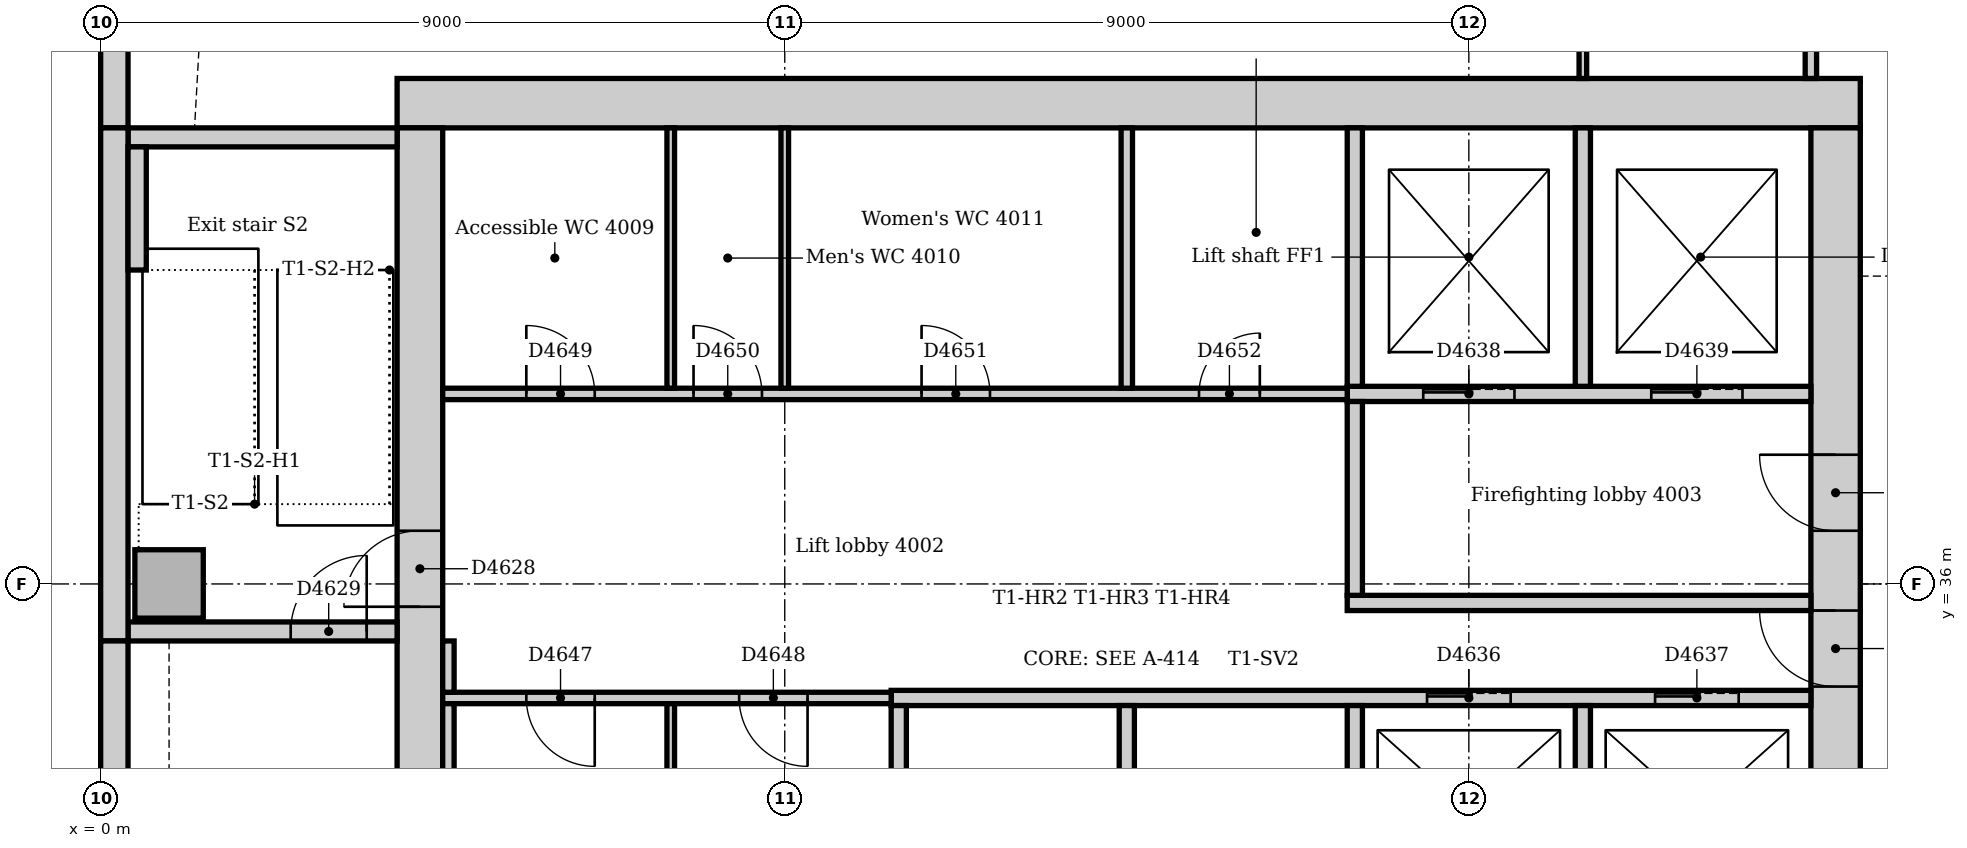
"""IFC4 building model, lengths in metres.
Left out: names, types, materials, properties, quantities, classifications, styles, units other than length and angle.
Written with IfcOpenShell. Run it as: python <this file> out.ifc"""

import sys

from ifc_helpers import new_model, si_unit, direction, frame, frame_2d, origin, origin_2d, place, context, subcontext, project, spatial, rectangle, extrude, element, fill, save


model = new_model("IFC4")
c1 = context("Model", 3, precision=1e-05, world=origin(), true_north=direction((0.0, 1.0)))
c2 = subcontext(c1, "Body", "Model", "MODEL_VIEW")
j1 = project(units=[si_unit("LENGTHUNIT", "METRE"), si_unit("PLANEANGLEUNIT", "RADIAN")], contexts=[c1])
p1 = place(None, origin())
s1 = spatial("IfcSite", under=j1, at=p1, CompositionType="ELEMENT")
p2 = place(p1, origin())
s2 = spatial("IfcBuilding", under=s1, at=p2, CompositionType="ELEMENT")
p3 = place(p2, frame((0.0, 0.0, 169.0)))
s3 = spatial("IfcBuildingStorey", under=s2, at=p3, CompositionType="ELEMENT", Elevation=169.0)
p4 = place(p3, frame((23.15, 42.325, 0.0), z_axis=(0.0, 0.0, 1.0), x_axis=(-1.0, 0.0, 0.0)))
e1 = element("IfcWall", 1, at=p4, inside=s3, PredefinedType="SOLIDWALL", context=c2, shape_type="SweptSolid", body=[
    extrude(rectangle(XDim=19.25, YDim=0.65, at=frame_2d((9.625, 0.0))), origin(), (0.0, 0.0, 1.0), 4.0),
])
p5 = place(p3, frame((22.825, 31.5, 0.0), z_axis=(0.0, 0.0, 1.0), x_axis=(0.0, 1.0, 0.0)))
e2 = element("IfcWall", 2, at=p5, inside=s3, PredefinedType="SOLIDWALL", context=c2, shape_type="SweptSolid", body=[
    extrude(rectangle(XDim=10.5, YDim=0.65, at=frame_2d((5.25, 0.0))), origin(), (0.0, 0.0, 1.0), 4.0),
])
p6 = place(p5, frame((3.15, 0.0, 0.0)))
e3 = element("IfcOpeningElement", 3, at=p6, cuts=e2, PredefinedType="OPENING", context=c2, shape_type="SweptSolid", body=[
    extrude(rectangle(XDim=1.0, YDim=2.1, at=frame_2d((0.5, 1.05))), frame((0.0, 0.335, 0.0), z_axis=(0.0, -1.0, 0.0), x_axis=(1.0, 0.0, 0.0)), (0.0, 0.0, 1.0), 0.67),
])
p7 = place(p5, frame((5.2, 0.0, 0.0)))
e4 = element("IfcOpeningElement", 4, at=p7, cuts=e2, PredefinedType="OPENING", context=c2, shape_type="SweptSolid", body=[
    extrude(rectangle(XDim=1.0, YDim=2.1, at=frame_2d((0.5, 1.05))), frame((0.0, 0.335, 0.0), z_axis=(0.0, -1.0, 0.0), x_axis=(1.0, 0.0, 0.0)), (0.0, 0.0, 1.0), 0.67),
])
p8 = place(p3, frame((4.2, 42.0, 0.0), z_axis=(0.0, 0.0, 1.0), x_axis=(0.0, -1.0, 0.0)))
e5 = element("IfcWall", 5, at=p8, inside=s3, PredefinedType="SOLIDWALL", context=c2, shape_type="SweptSolid", body=[
    extrude(rectangle(XDim=10.5, YDim=0.6, at=frame_2d((5.25, 0.0))), origin(), (0.0, 0.0, 1.0), 4.0),
])
p9 = place(p8, frame((5.3, 0.0, 0.0)))
e6 = element("IfcOpeningElement", 6, at=p9, cuts=e5, PredefinedType="OPENING", context=c2, shape_type="SweptSolid", body=[
    extrude(rectangle(XDim=1.0, YDim=2.1, at=frame_2d((0.5, 1.05))), frame((0.0, 0.31, 0.0), z_axis=(0.0, -1.0, 0.0), x_axis=(1.0, 0.0, 0.0)), (0.0, 0.0, 1.0), 0.62),
])
p10 = place(p3, frame((0.36, 35.375, 0.0), z_axis=(0.0, 0.0, 1.0), x_axis=(1.0, 0.0, 0.0)))
e7 = element("IfcWall", 7, at=p10, inside=s3, PredefinedType="SOLIDWALL", context=c2, shape_type="SweptSolid", body=[
    extrude(rectangle(XDim=3.54, YDim=0.25, at=frame_2d((1.77, 0.0))), origin(), (0.0, 0.0, 1.0), 4.0),
])
p11 = place(p10, frame((2.14, 0.0, 0.0)))
e8 = element("IfcOpeningElement", 8, at=p11, cuts=e7, PredefinedType="OPENING", context=c2, shape_type="SweptSolid", body=[
    extrude(rectangle(XDim=1.0, YDim=2.1, at=frame_2d((0.5, 1.05))), frame((0.0, 0.135, 0.0), z_axis=(0.0, -1.0, 0.0), x_axis=(1.0, 0.0, 0.0)), (0.0, 0.0, 1.0), 0.27),
])
p12 = place(p3, frame((3.9, 41.875, 0.0), z_axis=(0.0, 0.0, 1.0), x_axis=(-1.0, 0.0, 0.0)))
e9 = element("IfcWall", 9, at=p12, inside=s3, PredefinedType="SOLIDWALL", context=c2, shape_type="SweptSolid", body=[
    extrude(rectangle(XDim=3.54, YDim=0.25, at=frame_2d((1.77, 0.0))), origin(), (0.0, 0.0, 1.0), 4.0),
])
p13 = place(p3, frame((0.9, 36.0, 0.0), z_axis=(0.0, 0.0, 1.0), x_axis=(1.0, 0.0, 0.0)))
e10 = element("IfcColumn", 10, at=p13, inside=s3, PredefinedType="COLUMN", context=c2, shape_type="SweptSolid", body=[
    extrude(rectangle(XDim=0.9, YDim=0.9, at=origin_2d()), origin(), (0.0, 0.0, 1.0), 4.0),
])
p14 = place(p3, frame((0.18, 49.757, 0.0), z_axis=(0.0, 0.0, 1.0), x_axis=(0.0, -1.0, 0.0)))
e11 = element("IfcWall", 11, at=p14, inside=s3, PredefinedType="STANDARD", context=c2, shape_type="SweptSolid", body=[
    extrude(rectangle(XDim=7.757, YDim=0.36, at=frame_2d((3.879, 0.0))), origin(), (0.0, 0.0, 1.0), 3.85),
])
p15 = place(p14, frame((3.107, 0.0, 0.9)))
e12 = element("IfcOpeningElement", 12, at=p15, cuts=e11, PredefinedType="OPENING", context=c2, shape_type="SweptSolid", body=[
    extrude(rectangle(XDim=3.3, YDim=1.6, at=frame_2d((1.65, 0.8))), frame((0.0, 0.19, 0.0), z_axis=(0.0, -1.0, 0.0), x_axis=(1.0, 0.0, 0.0)), (0.0, 0.0, 1.0), 0.38),
])
p16 = place(p3, frame((0.18, 42.0, 0.0), z_axis=(0.0, 0.0, 1.0), x_axis=(0.0, -1.0, 0.0)))
e13 = element("IfcWall", 13, at=p16, inside=s3, PredefinedType="STANDARD", context=c2, shape_type="SweptSolid", body=[
    extrude(rectangle(XDim=6.75, YDim=0.36, at=frame_2d((3.375, 0.0))), origin(), (0.0, 0.0, 1.0), 3.85),
])
p17 = place(p3, frame((0.18, 35.25, 0.0), z_axis=(0.0, 0.0, 1.0), x_axis=(0.0, -1.0, 0.0)))
e14 = element("IfcWall", 14, at=p17, inside=s3, PredefinedType="STANDARD", context=c2, shape_type="SweptSolid", body=[
    extrude(rectangle(XDim=7.5, YDim=0.36, at=frame_2d((3.75, 0.0))), origin(), (0.0, 0.0, 1.0), 3.85),
])
p18 = place(p3, frame((0.48, 40.13, 0.0), z_axis=(0.0, 0.0, 1.0), x_axis=(0.0, 1.0, 0.0)))
e15 = element("IfcWall", 15, at=p18, inside=s3, PredefinedType="STANDARD", context=c2, shape_type="SweptSolid", body=[
    extrude(rectangle(XDim=1.62, YDim=0.24, at=frame_2d((0.81, 0.0))), origin(), (0.0, 0.0, 1.0), 4.0),
])
p19 = place(p3, frame((16.4, 35.75, 0.0), z_axis=(0.0, 0.0, 1.0), x_axis=(1.0, 0.0, 0.0)))
e16 = element("IfcWall", 16, at=p19, inside=s3, PredefinedType="PARTITIONING", context=c2, shape_type="SweptSolid", body=[
    extrude(rectangle(XDim=6.1, YDim=0.2, at=frame_2d((3.05, 0.0))), origin(), (0.0, 0.0, 1.0), 3.85),
])
p20 = place(p3, frame((16.4, 38.5, 0.0), z_axis=(0.0, 0.0, 1.0), x_axis=(1.0, 0.0, 0.0)))
e17 = element("IfcWall", 17, at=p20, inside=s3, PredefinedType="PARTITIONING", context=c2, shape_type="SweptSolid", body=[
    extrude(rectangle(XDim=6.1, YDim=0.2, at=frame_2d((3.05, 0.0))), origin(), (0.0, 0.0, 1.0), 3.85),
])
p21 = place(p20, frame((1.0, 0.0, 0.0)))
e18 = element("IfcOpeningElement", 18, at=p21, cuts=e17, PredefinedType="OPENING", context=c2, shape_type="SweptSolid", body=[
    extrude(rectangle(XDim=1.2, YDim=2.1, at=frame_2d((0.6, 1.05))), frame((0.0, 0.11, 0.0), z_axis=(0.0, -1.0, 0.0), x_axis=(1.0, 0.0, 0.0)), (0.0, 0.0, 1.0), 0.22),
])
p22 = place(p20, frame((4.0, 0.0, 0.0)))
e19 = element("IfcOpeningElement", 19, at=p22, cuts=e17, PredefinedType="OPENING", context=c2, shape_type="SweptSolid", body=[
    extrude(rectangle(XDim=1.2, YDim=2.1, at=frame_2d((0.6, 1.05))), frame((0.0, 0.11, 0.0), z_axis=(0.0, -1.0, 0.0), x_axis=(1.0, 0.0, 0.0)), (0.0, 0.0, 1.0), 0.22),
])
p23 = place(p3, frame((16.5, 35.85, 0.0), z_axis=(0.0, 0.0, 1.0), x_axis=(0.0, 1.0, 0.0)))
e20 = element("IfcWall", 20, at=p23, inside=s3, PredefinedType="PARTITIONING", context=c2, shape_type="SweptSolid", body=[
    extrude(rectangle(XDim=2.55, YDim=0.2, at=frame_2d((1.275, 0.0))), origin(), (0.0, 0.0, 1.0), 3.85),
])
p24 = place(p3, frame((10.4, 34.5, 0.0), z_axis=(0.0, 0.0, 1.0), x_axis=(1.0, 0.0, 0.0)))
e21 = element("IfcWall", 21, at=p24, inside=s3, PredefinedType="PARTITIONING", context=c2, shape_type="SweptSolid", body=[
    extrude(rectangle(XDim=12.1, YDim=0.2, at=frame_2d((6.05, 0.0))), origin(), (0.0, 0.0, 1.0), 3.85),
])
p25 = place(p24, frame((7.05, 0.0, 0.0)))
e22 = element("IfcOpeningElement", 22, at=p25, cuts=e21, PredefinedType="OPENING", context=c2, shape_type="SweptSolid", body=[
    extrude(rectangle(XDim=1.1, YDim=2.1, at=frame_2d((0.55, 1.05))), frame((0.0, 0.11, 0.0), z_axis=(0.0, -1.0, 0.0), x_axis=(1.0, 0.0, 0.0)), (0.0, 0.0, 1.0), 0.22),
])
p26 = place(p24, frame((10.05, 0.0, 0.0)))
e23 = element("IfcOpeningElement", 23, at=p26, cuts=e21, PredefinedType="OPENING", context=c2, shape_type="SweptSolid", body=[
    extrude(rectangle(XDim=1.1, YDim=2.1, at=frame_2d((0.55, 1.05))), frame((0.0, 0.11, 0.0), z_axis=(0.0, -1.0, 0.0), x_axis=(1.0, 0.0, 0.0)), (0.0, 0.0, 1.0), 0.22),
])
for number, where, z_axis, x_axis in (
    (24, (10.5, 31.75, 0.0), (0.0, 0.0, 1.0), (0.0, 1.0, 0.0)),
    (25, (13.5, 31.75, 0.0), (0.0, 0.0, 1.0), (0.0, 1.0, 0.0)),
    (26, (16.5, 31.75, 0.0), (0.0, 0.0, 1.0), (0.0, 1.0, 0.0)),
    (27, (19.5, 31.75, 0.0), (0.0, 0.0, 1.0), (0.0, 1.0, 0.0)),
):
    element("IfcWall", number, at=place(p3, frame(where, z_axis=z_axis, x_axis=x_axis)), inside=s3, PredefinedType="PARTITIONING", context=c2, shape_type="SweptSolid", body=[
        extrude(rectangle(XDim=2.65, YDim=0.2, at=frame_2d((1.325, 0.0))), origin(), (0.0, 0.0, 1.0), 3.85),
    ])
for number, where, z_axis, x_axis in (
    (28, (16.5, 38.6, 0.0), (0.0, 0.0, 1.0), (0.0, 1.0, 0.0)),
    (29, (19.5, 38.6, 0.0), (0.0, 0.0, 1.0), (0.0, 1.0, 0.0)),
):
    element("IfcWall", number, at=place(p3, frame(where, z_axis=z_axis, x_axis=x_axis)), inside=s3, PredefinedType="PARTITIONING", context=c2, shape_type="SweptSolid", body=[
        extrude(rectangle(XDim=3.4, YDim=0.2, at=frame_2d((1.7, 0.0))), origin(), (0.0, 0.0, 1.0), 3.85),
    ])
p27 = place(p3, frame((4.5, 38.5, 0.0), z_axis=(0.0, 0.0, 1.0), x_axis=(1.0, 0.0, 0.0)))
e30 = element("IfcWall", 30, at=p27, inside=s3, PredefinedType="PARTITIONING", context=c2, shape_type="SweptSolid", body=[
    extrude(rectangle(XDim=11.9, YDim=0.15, at=frame_2d((5.95, 0.0))), origin(), (0.0, 0.0, 1.0), 3.85),
])
p28 = place(p27, frame((1.1, 0.0, 0.0)))
e31 = element("IfcOpeningElement", 31, at=p28, cuts=e30, PredefinedType="OPENING", context=c2, shape_type="SweptSolid", body=[
    extrude(rectangle(XDim=0.9, YDim=2.1, at=frame_2d((0.45, 1.05))), frame((0.0, 0.085, 0.0), z_axis=(0.0, -1.0, 0.0), x_axis=(1.0, 0.0, 0.0)), (0.0, 0.0, 1.0), 0.17),
])
p29 = place(p27, frame((3.3, 0.0, 0.0)))
e32 = element("IfcOpeningElement", 32, at=p29, cuts=e30, PredefinedType="OPENING", context=c2, shape_type="SweptSolid", body=[
    extrude(rectangle(XDim=0.9, YDim=2.1, at=frame_2d((0.45, 1.05))), frame((0.0, 0.085, 0.0), z_axis=(0.0, -1.0, 0.0), x_axis=(1.0, 0.0, 0.0)), (0.0, 0.0, 1.0), 0.17),
])
p30 = place(p27, frame((6.3, 0.0, 0.0)))
e33 = element("IfcOpeningElement", 33, at=p30, cuts=e30, PredefinedType="OPENING", context=c2, shape_type="SweptSolid", body=[
    extrude(rectangle(XDim=0.9, YDim=2.1, at=frame_2d((0.45, 1.05))), frame((0.0, 0.085, 0.0), z_axis=(0.0, -1.0, 0.0), x_axis=(1.0, 0.0, 0.0)), (0.0, 0.0, 1.0), 0.17),
])
p31 = place(p27, frame((9.95, 0.0, 0.0)))
e34 = element("IfcOpeningElement", 34, at=p31, cuts=e30, PredefinedType="OPENING", context=c2, shape_type="SweptSolid", body=[
    extrude(rectangle(XDim=0.8, YDim=2.1, at=frame_2d((0.4, 1.05))), frame((0.0, 0.085, 0.0), z_axis=(0.0, -1.0, 0.0), x_axis=(1.0, 0.0, 0.0)), (0.0, 0.0, 1.0), 0.17),
])
p32 = place(p3, frame((4.5, 34.5, 0.0), z_axis=(0.0, 0.0, 1.0), x_axis=(1.0, 0.0, 0.0)))
e35 = element("IfcWall", 35, at=p32, inside=s3, PredefinedType="PARTITIONING", context=c2, shape_type="SweptSolid", body=[
    extrude(rectangle(XDim=5.9, YDim=0.15, at=frame_2d((2.95, 0.0))), origin(), (0.0, 0.0, 1.0), 3.85),
])
p33 = place(p32, frame((1.1, 0.0, 0.0)))
e36 = element("IfcOpeningElement", 36, at=p33, cuts=e35, PredefinedType="OPENING", context=c2, shape_type="SweptSolid", body=[
    extrude(rectangle(XDim=0.9, YDim=2.1, at=frame_2d((0.45, 1.05))), frame((0.0, 0.085, 0.0), z_axis=(0.0, -1.0, 0.0), x_axis=(1.0, 0.0, 0.0)), (0.0, 0.0, 1.0), 0.17),
])
p34 = place(p32, frame((3.9, 0.0, 0.0)))
e37 = element("IfcOpeningElement", 37, at=p34, cuts=e35, PredefinedType="OPENING", context=c2, shape_type="SweptSolid", body=[
    extrude(rectangle(XDim=0.9, YDim=2.1, at=frame_2d((0.45, 1.05))), frame((0.0, 0.085, 0.0), z_axis=(0.0, -1.0, 0.0), x_axis=(1.0, 0.0, 0.0)), (0.0, 0.0, 1.0), 0.17),
])
p35 = place(p3, frame((4.575, 34.575, 0.0), z_axis=(0.0, 0.0, 1.0), x_axis=(0.0, 1.0, 0.0)))
e38 = element("IfcWall", 38, at=p35, inside=s3, PredefinedType="PARTITIONING", context=c2, shape_type="SweptSolid", body=[
    extrude(rectangle(XDim=0.675, YDim=0.15, at=frame_2d((0.338, 0.0))), origin(), (0.0, 0.0, 1.0), 3.85),
])
p36 = place(p3, frame((4.575, 31.75, 0.0), z_axis=(0.0, 0.0, 1.0), x_axis=(0.0, 1.0, 0.0)))
e39 = element("IfcWall", 39, at=p36, inside=s3, PredefinedType="PARTITIONING", context=c2, shape_type="SweptSolid", body=[
    extrude(rectangle(XDim=2.675, YDim=0.15, at=frame_2d((1.337, 0.0))), origin(), (0.0, 0.0, 1.0), 3.85),
])
p37 = place(p3, frame((22.5, 42.65, 0.0), z_axis=(0.0, 0.0, 1.0), x_axis=(0.0, 1.0, 0.0)))
e40 = element("IfcWall", 40, at=p37, inside=s3, PredefinedType="PARTITIONING", context=c2, shape_type="SweptSolid", body=[
    extrude(rectangle(XDim=2.275, YDim=0.15, at=frame_2d((1.137, 0.0))), origin(), (0.0, 0.0, 1.0), 3.85),
])
p38 = place(p3, frame((13.5, 38.575, 0.0), z_axis=(0.0, 0.0, 1.0), x_axis=(0.0, 1.0, 0.0)))
e41 = element("IfcWall", 41, at=p38, inside=s3, PredefinedType="PARTITIONING", context=c2, shape_type="SweptSolid", body=[
    extrude(rectangle(XDim=3.425, YDim=0.15, at=frame_2d((1.712, 0.0))), origin(), (0.0, 0.0, 1.0), 3.85),
])
p39 = place(p3, frame((19.5, 42.65, 0.0), z_axis=(0.0, 0.0, 1.0), x_axis=(0.0, 1.0, 0.0)))
e42 = element("IfcWall", 42, at=p39, inside=s3, PredefinedType="PARTITIONING", context=c2, shape_type="SweptSolid", body=[
    extrude(rectangle(XDim=10.99, YDim=0.1, at=frame_2d((5.495, 0.0))), origin(), (0.0, 0.0, 1.0), 3.85),
])
p40 = place(p39, frame((5.05, 0.0, 0.0)))
e43 = element("IfcOpeningElement", 43, at=p40, cuts=e42, PredefinedType="OPENING", context=c2, shape_type="SweptSolid", body=[
    extrude(rectangle(XDim=0.9, YDim=2.1, at=frame_2d((0.45, 1.05))), frame((0.0, 0.06, 0.0), z_axis=(0.0, -1.0, 0.0), x_axis=(1.0, 0.0, 0.0)), (0.0, 0.0, 1.0), 0.12),
])
for number, where, z_axis, x_axis in (
    (44, (7.5, 38.575, 0.0), (0.0, 0.0, 1.0), (0.0, 1.0, 0.0)),
    (45, (9.0, 38.575, 0.0), (0.0, 0.0, 1.0), (0.0, 1.0, 0.0)),
):
    element("IfcWall", number, at=place(p3, frame(where, z_axis=z_axis, x_axis=x_axis)), inside=s3, PredefinedType="PARTITIONING", context=c2, shape_type="SweptSolid", body=[
        extrude(rectangle(XDim=3.425, YDim=0.1, at=frame_2d((1.712, 0.0))), origin(), (0.0, 0.0, 1.0), 3.85),
    ])
p41 = place(p3, frame((7.5, 31.75, 0.0), z_axis=(0.0, 0.0, 1.0), x_axis=(0.0, 1.0, 0.0)))
e46 = element("IfcWall", 46, at=p41, inside=s3, PredefinedType="PARTITIONING", context=c2, shape_type="SweptSolid", body=[
    extrude(rectangle(XDim=2.675, YDim=0.1, at=frame_2d((1.337, 0.0))), origin(), (0.0, 0.0, 1.0), 3.85),
])
p42 = place(p9, frame((1.0, 0.0, 0.0), z_axis=(0.0, 0.0, 1.0), x_axis=(-1.0, 0.0, 0.0)))
e47 = element("IfcDoor", 47, at=p42, inside=s3, OperationType="SINGLE_SWING_LEFT", PredefinedType="DOOR", context=c2, shape_type="SweptSolid", body=[
    extrude(rectangle(XDim=1.0, YDim=2.1, at=frame_2d((0.5, 1.05))), frame((0.0, 0.025, 0.0), z_axis=(0.0, -1.0, 0.0), x_axis=(1.0, 0.0, 0.0)), (0.0, 0.0, 1.0), 0.05),
])
fill(e6, e47)
p43 = place(p11, origin())
e48 = element("IfcDoor", 48, at=p43, inside=s3, OperationType="SINGLE_SWING_RIGHT", PredefinedType="DOOR", context=c2, shape_type="SweptSolid", body=[
    extrude(rectangle(XDim=1.0, YDim=2.1, at=frame_2d((0.5, 1.05))), frame((0.0, 0.025, 0.0), z_axis=(0.0, -1.0, 0.0), x_axis=(1.0, 0.0, 0.0)), (0.0, 0.0, 1.0), 0.05),
])
fill(e8, e48)
p44 = place(p25, origin())
e49 = element("IfcDoor", 49, at=p44, inside=s3, OperationType="SLIDING_TO_LEFT", PredefinedType="DOOR", context=c2, shape_type="SweptSolid", body=[
    extrude(rectangle(XDim=1.1, YDim=2.1, at=frame_2d((0.55, 1.05))), frame((0.0, 0.025, 0.0), z_axis=(0.0, -1.0, 0.0), x_axis=(1.0, 0.0, 0.0)), (0.0, 0.0, 1.0), 0.05),
])
fill(e22, e49)
p45 = place(p26, origin())
e50 = element("IfcDoor", 50, at=p45, inside=s3, OperationType="SLIDING_TO_LEFT", PredefinedType="DOOR", context=c2, shape_type="SweptSolid", body=[
    extrude(rectangle(XDim=1.1, YDim=2.1, at=frame_2d((0.55, 1.05))), frame((0.0, 0.025, 0.0), z_axis=(0.0, -1.0, 0.0), x_axis=(1.0, 0.0, 0.0)), (0.0, 0.0, 1.0), 0.05),
])
fill(e23, e50)
p46 = place(p21, origin())
e51 = element("IfcDoor", 51, at=p46, inside=s3, OperationType="SLIDING_TO_LEFT", PredefinedType="DOOR", context=c2, shape_type="SweptSolid", body=[
    extrude(rectangle(XDim=1.2, YDim=2.1, at=frame_2d((0.6, 1.05))), frame((0.0, 0.025, 0.0), z_axis=(0.0, -1.0, 0.0), x_axis=(1.0, 0.0, 0.0)), (0.0, 0.0, 1.0), 0.05),
])
fill(e18, e51)
p47 = place(p22, origin())
e52 = element("IfcDoor", 52, at=p47, inside=s3, OperationType="SLIDING_TO_LEFT", PredefinedType="DOOR", context=c2, shape_type="SweptSolid", body=[
    extrude(rectangle(XDim=1.2, YDim=2.1, at=frame_2d((0.6, 1.05))), frame((0.0, 0.025, 0.0), z_axis=(0.0, -1.0, 0.0), x_axis=(1.0, 0.0, 0.0)), (0.0, 0.0, 1.0), 0.05),
])
fill(e19, e52)
p48 = place(p6, origin())
e53 = element("IfcDoor", 53, at=p48, inside=s3, OperationType="SINGLE_SWING_RIGHT", PredefinedType="DOOR", context=c2, shape_type="SweptSolid", body=[
    extrude(rectangle(XDim=1.0, YDim=2.1, at=frame_2d((0.5, 1.05))), frame((0.0, 0.025, 0.0), z_axis=(0.0, -1.0, 0.0), x_axis=(1.0, 0.0, 0.0)), (0.0, 0.0, 1.0), 0.05),
])
fill(e3, e53)
p49 = place(p7, origin())
e54 = element("IfcDoor", 54, at=p49, inside=s3, OperationType="SINGLE_SWING_RIGHT", PredefinedType="DOOR", context=c2, shape_type="SweptSolid", body=[
    extrude(rectangle(XDim=1.0, YDim=2.1, at=frame_2d((0.5, 1.05))), frame((0.0, 0.025, 0.0), z_axis=(0.0, -1.0, 0.0), x_axis=(1.0, 0.0, 0.0)), (0.0, 0.0, 1.0), 0.05),
])
fill(e4, e54)
p50 = place(p33, frame((0.9, 0.0, 0.0), z_axis=(0.0, 0.0, 1.0), x_axis=(-1.0, 0.0, 0.0)))
e55 = element("IfcDoor", 55, at=p50, inside=s3, OperationType="SINGLE_SWING_LEFT", PredefinedType="DOOR", context=c2, shape_type="SweptSolid", body=[
    extrude(rectangle(XDim=0.9, YDim=2.1, at=frame_2d((0.45, 1.05))), frame((0.0, 0.025, 0.0), z_axis=(0.0, -1.0, 0.0), x_axis=(1.0, 0.0, 0.0)), (0.0, 0.0, 1.0), 0.05),
])
fill(e36, e55)
p51 = place(p34, frame((0.9, 0.0, 0.0), z_axis=(0.0, 0.0, 1.0), x_axis=(-1.0, 0.0, 0.0)))
e56 = element("IfcDoor", 56, at=p51, inside=s3, OperationType="SINGLE_SWING_LEFT", PredefinedType="DOOR", context=c2, shape_type="SweptSolid", body=[
    extrude(rectangle(XDim=0.9, YDim=2.1, at=frame_2d((0.45, 1.05))), frame((0.0, 0.025, 0.0), z_axis=(0.0, -1.0, 0.0), x_axis=(1.0, 0.0, 0.0)), (0.0, 0.0, 1.0), 0.05),
])
fill(e37, e56)
p52 = place(p28, origin())
e57 = element("IfcDoor", 57, at=p52, inside=s3, OperationType="SINGLE_SWING_LEFT", PredefinedType="DOOR", context=c2, shape_type="SweptSolid", body=[
    extrude(rectangle(XDim=0.9, YDim=2.1, at=frame_2d((0.45, 1.05))), frame((0.0, 0.025, 0.0), z_axis=(0.0, -1.0, 0.0), x_axis=(1.0, 0.0, 0.0)), (0.0, 0.0, 1.0), 0.05),
])
fill(e31, e57)
p53 = place(p29, origin())
e58 = element("IfcDoor", 58, at=p53, inside=s3, OperationType="SINGLE_SWING_LEFT", PredefinedType="DOOR", context=c2, shape_type="SweptSolid", body=[
    extrude(rectangle(XDim=0.9, YDim=2.1, at=frame_2d((0.45, 1.05))), frame((0.0, 0.025, 0.0), z_axis=(0.0, -1.0, 0.0), x_axis=(1.0, 0.0, 0.0)), (0.0, 0.0, 1.0), 0.05),
])
fill(e32, e58)
p54 = place(p30, origin())
e59 = element("IfcDoor", 59, at=p54, inside=s3, OperationType="SINGLE_SWING_LEFT", PredefinedType="DOOR", context=c2, shape_type="SweptSolid", body=[
    extrude(rectangle(XDim=0.9, YDim=2.1, at=frame_2d((0.45, 1.05))), frame((0.0, 0.025, 0.0), z_axis=(0.0, -1.0, 0.0), x_axis=(1.0, 0.0, 0.0)), (0.0, 0.0, 1.0), 0.05),
])
fill(e33, e59)
p55 = place(p31, origin())
e60 = element("IfcDoor", 60, at=p55, inside=s3, OperationType="SINGLE_SWING_RIGHT", PredefinedType="DOOR", context=c2, shape_type="SweptSolid", body=[
    extrude(rectangle(XDim=0.8, YDim=2.1, at=frame_2d((0.4, 1.05))), frame((0.0, 0.025, 0.0), z_axis=(0.0, -1.0, 0.0), x_axis=(1.0, 0.0, 0.0)), (0.0, 0.0, 1.0), 0.05),
])
fill(e34, e60)
save(model, sys.argv[1])
